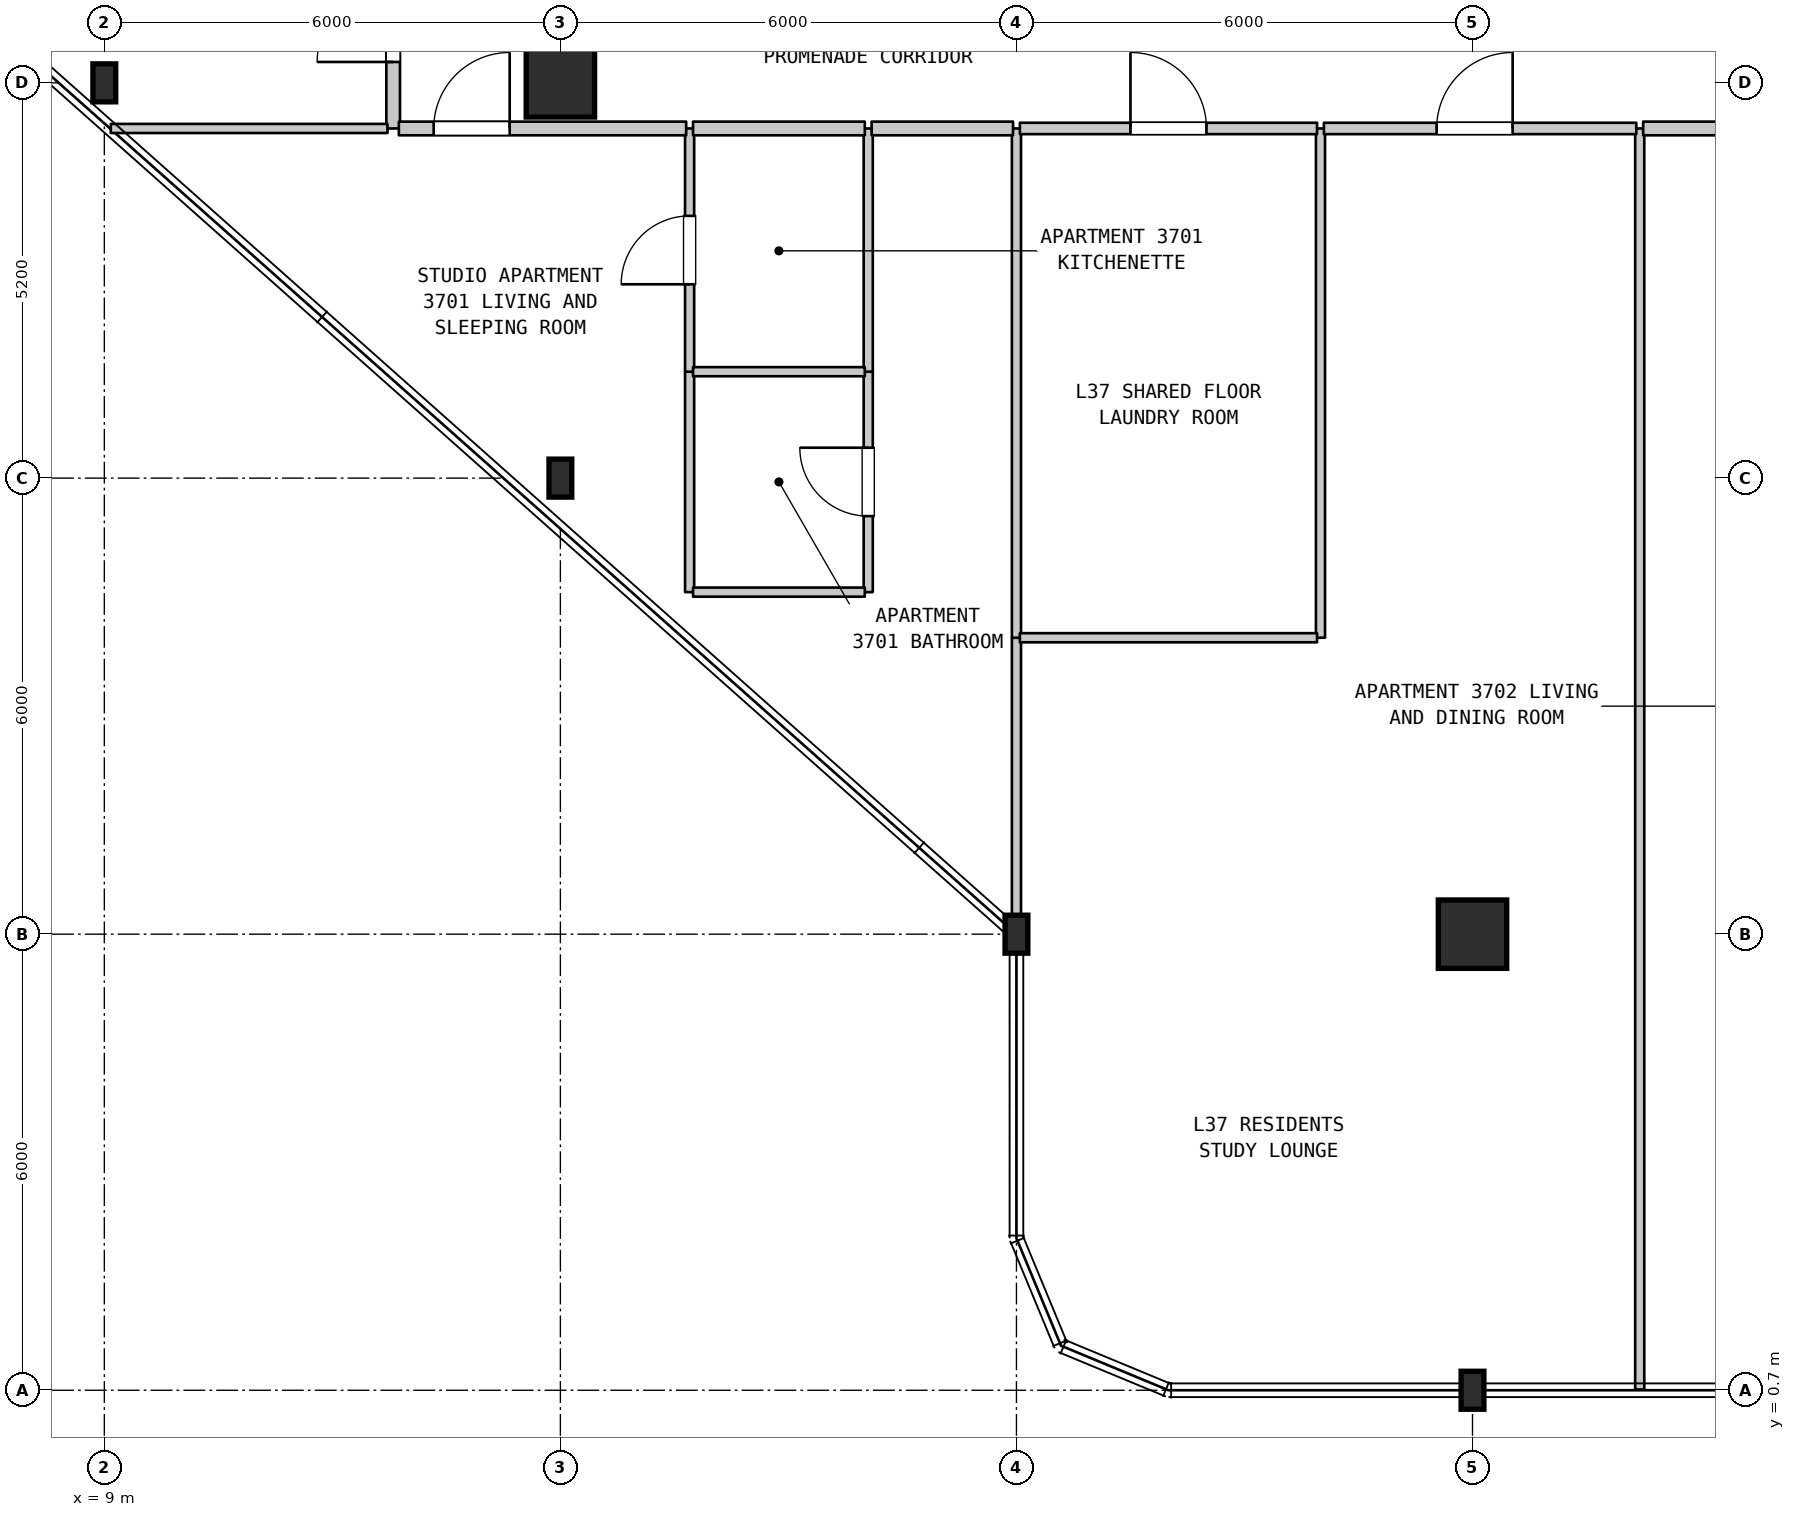
"""IFC4 building model, lengths in metres.
Left out: names, types, materials, properties, quantities, classifications, styles, units other than length and angle.
Written with IfcOpenShell. Run it as: python <this file> out.ifc"""

import sys

from ifc_helpers import new_model, si_unit, direction, frame, frame_2d, origin, origin_2d, place, context, subcontext, project, spatial, rectangle, i_section, extrude, element, fill, save


model = new_model("IFC4")
c1 = context("Model", 3, precision=1e-05, world=origin(), true_north=direction((0.0, 1.0)))
c2 = subcontext(c1, "Body", "Model", "MODEL_VIEW")
j1 = project(units=[si_unit("LENGTHUNIT", "METRE"), si_unit("PLANEANGLEUNIT", "RADIAN")], contexts=[c1])
p1 = place(None, origin())
s1 = spatial("IfcSite", under=j1, at=p1, CompositionType="ELEMENT")
p2 = place(p1, origin())
s2 = spatial("IfcBuilding", under=s1, at=p2, CompositionType="ELEMENT")
p3 = place(p2, frame((0.0, 0.0, 152.0)))
s3 = spatial("IfcBuildingStorey", under=s2, at=p3, CompositionType="ELEMENT", Elevation=152.0)
for number, where, z_axis, x_axis in (
    (1, (9.0, 17.9, 0.0), (0.0, 0.0, 1.0), (1.0, 0.0, 0.0)),
    (2, (15.0, 12.7, 0.0), (0.0, 0.0, 1.0), (1.0, 0.0, 0.0)),
):
    element("IfcColumn", number, at=place(p3, frame(where, z_axis=z_axis, x_axis=x_axis)), inside=s3, PredefinedType="COLUMN", context=c2, shape_type="SweptSolid", body=[
        extrude(i_section(OverallWidth=0.3, OverallDepth=0.5, WebThickness=0.014, FlangeThickness=0.028, FilletRadius=0.027, at=origin_2d()), origin(), (0.0, 0.0, 1.0), 3.7),
    ])
p4 = place(p3, frame((15.0, 17.9, 0.0), z_axis=(0.0, 0.0, 1.0), x_axis=(1.0, 0.0, 0.0)))
e3 = element("IfcColumn", 3, at=p4, inside=s3, PredefinedType="COLUMN", context=c2, shape_type="SweptSolid", body=[
    extrude(rectangle(XDim=0.9, YDim=0.9, at=origin_2d()), origin(), (0.0, 0.0, 1.0), 3.7),
])
for number, where, z_axis, x_axis in (
    (4, (21.0, 6.7, 0.0), (0.0, 0.0, 1.0), (1.0, 0.0, 0.0)),
    (5, (27.0, 0.7, 0.0), (0.0, 0.0, 1.0), (1.0, 0.0, 0.0)),
):
    element("IfcColumn", number, at=place(p3, frame(where, z_axis=z_axis, x_axis=x_axis)), inside=s3, PredefinedType="COLUMN", context=c2, shape_type="SweptSolid", body=[
        extrude(i_section(OverallWidth=0.3, OverallDepth=0.5, WebThickness=0.014, FlangeThickness=0.028, FilletRadius=0.027, at=origin_2d()), origin(), (0.0, 0.0, 1.0), 3.7),
    ])
p5 = place(p3, frame((27.0, 6.7, 0.0), z_axis=(0.0, 0.0, 1.0), x_axis=(1.0, 0.0, 0.0)))
e6 = element("IfcColumn", 6, at=p5, inside=s3, PredefinedType="COLUMN", context=c2, shape_type="SweptSolid", body=[
    extrude(rectangle(XDim=0.9, YDim=0.9, at=origin_2d()), origin(), (0.0, 0.0, 1.0), 3.7),
])
p6 = place(p3, frame((12.8, 17.3, 0.0), z_axis=(0.0, 0.0, 1.0), x_axis=(0.0, 1.0, 0.0)))
e7 = element("IfcWall", 7, at=p6, inside=s3, PredefinedType="STANDARD", context=c2, shape_type="SweptSolid", body=[
    extrude(rectangle(XDim=2.75, YDim=0.18, at=frame_2d((1.375, 0.0))), origin(), (0.0, 0.0, 1.0), 3.385),
])
p7 = place(p6, frame((0.875, 0.0, 0.0)))
e8 = element("IfcOpeningElement", 8, at=p7, cuts=e7, PredefinedType="OPENING", context=c2, shape_type="SweptSolid", body=[
    extrude(rectangle(XDim=1.0, YDim=2.15, at=frame_2d((0.5, 1.075))), frame((0.0, 0.1, 0.0), z_axis=(0.0, -1.0, 0.0), x_axis=(1.0, 0.0, 0.0)), (0.0, 0.0, 1.0), 0.2),
])
p8 = place(p3, frame((16.7, 11.2, 0.0), z_axis=(0.0, 0.0, 1.0), x_axis=(0.0, 1.0, 0.0)))
e9 = element("IfcWall", 9, at=p8, inside=s3, PredefinedType="PARTITIONING", context=c2, shape_type="SweptSolid", body=[
    extrude(rectangle(XDim=2.9, YDim=0.12, at=frame_2d((1.45, 0.0))), origin(), (0.0, 0.0, 1.0), 3.385),
])
p9 = place(p3, frame((16.7, 14.1, 0.0), z_axis=(0.0, 0.0, 1.0), x_axis=(0.0, 1.0, 0.0)))
e10 = element("IfcWall", 10, at=p9, inside=s3, PredefinedType="PARTITIONING", context=c2, shape_type="SweptSolid", body=[
    extrude(rectangle(XDim=3.2, YDim=0.12, at=frame_2d((1.6, 0.0))), origin(), (0.0, 0.0, 1.0), 3.385),
])
p10 = place(p9, frame((1.15, 0.0, 0.0)))
e11 = element("IfcOpeningElement", 11, at=p10, cuts=e10, PredefinedType="OPENING", context=c2, shape_type="SweptSolid", body=[
    extrude(rectangle(XDim=0.9, YDim=2.15, at=frame_2d((0.45, 1.075))), frame((0.0, 0.07, 0.0), z_axis=(0.0, -1.0, 0.0), x_axis=(1.0, 0.0, 0.0)), (0.0, 0.0, 1.0), 0.14),
])
p11 = place(p3, frame((19.05, 11.2, 0.0), z_axis=(0.0, 0.0, 1.0), x_axis=(0.0, 1.0, 0.0)))
e12 = element("IfcWall", 12, at=p11, inside=s3, PredefinedType="PARTITIONING", context=c2, shape_type="SweptSolid", body=[
    extrude(rectangle(XDim=2.9, YDim=0.12, at=frame_2d((1.45, 0.0))), origin(), (0.0, 0.0, 1.0), 3.385),
])
p12 = place(p11, frame((1.0, 0.0, 0.0)))
e13 = element("IfcOpeningElement", 13, at=p12, cuts=e12, PredefinedType="OPENING", context=c2, shape_type="SweptSolid", body=[
    extrude(rectangle(XDim=0.9, YDim=2.1, at=frame_2d((0.45, 1.05))), frame((0.0, 0.07, 0.0), z_axis=(0.0, -1.0, 0.0), x_axis=(1.0, 0.0, 0.0)), (0.0, 0.0, 1.0), 0.14),
])
p13 = place(p3, frame((19.05, 14.1, 0.0), z_axis=(0.0, 0.0, 1.0), x_axis=(0.0, 1.0, 0.0)))
e14 = element("IfcWall", 14, at=p13, inside=s3, PredefinedType="PARTITIONING", context=c2, shape_type="SweptSolid", body=[
    extrude(rectangle(XDim=3.2, YDim=0.12, at=frame_2d((1.6, 0.0))), origin(), (0.0, 0.0, 1.0), 3.385),
])
p14 = place(p3, frame((21.0, 6.71, 0.0), z_axis=(0.0, 0.0, 1.0), x_axis=(0.0, 1.0, 0.0)))
e15 = element("IfcWall", 15, at=p14, inside=s3, PredefinedType="PARTITIONING", context=c2, shape_type="SweptSolid", body=[
    extrude(rectangle(XDim=3.89, YDim=0.12, at=frame_2d((1.945, 0.0))), origin(), (0.0, 0.0, 1.0), 3.385),
])
for number, where, z_axis, x_axis in (
    (16, (21.0, 10.6, 0.0), (0.0, 0.0, 1.0), (0.0, 1.0, 0.0)),
    (17, (25.0, 10.6, 0.0), (0.0, 0.0, 1.0), (0.0, 1.0, 0.0)),
):
    element("IfcWall", number, at=place(p3, frame(where, z_axis=z_axis, x_axis=x_axis)), inside=s3, PredefinedType="PARTITIONING", context=c2, shape_type="SweptSolid", body=[
        extrude(rectangle(XDim=6.7, YDim=0.12, at=frame_2d((3.35, 0.0))), origin(), (0.0, 0.0, 1.0), 3.385),
    ])
p15 = place(p3, frame((29.2, 0.71, 0.0), z_axis=(0.0, 0.0, 1.0), x_axis=(0.0, 1.0, 0.0)))
e18 = element("IfcWall", 18, at=p15, inside=s3, PredefinedType="PARTITIONING", context=c2, shape_type="SweptSolid", body=[
    extrude(rectangle(XDim=16.59, YDim=0.12, at=frame_2d((8.295, 0.0))), origin(), (0.0, 0.0, 1.0), 3.385),
])
p16 = place(p3, frame((21.045, 10.6, 0.0), z_axis=(0.0, 0.0, 1.0), x_axis=(1.0, 0.0, 0.0)))
e19 = element("IfcWall", 19, at=p16, inside=s3, PredefinedType="PARTITIONING", context=c2, shape_type="SweptSolid", body=[
    extrude(rectangle(XDim=3.91, YDim=0.12, at=frame_2d((1.955, 0.0))), origin(), (0.0, 0.0, 1.0), 3.385),
])
for number, where, z_axis, x_axis in (
    (20, (16.745, 11.2, 0.0), (0.0, 0.0, 1.0), (1.0, 0.0, 0.0)),
    (21, (16.745, 14.1, 0.0), (0.0, 0.0, 1.0), (1.0, 0.0, 0.0)),
):
    element("IfcWall", number, at=place(p3, frame(where, z_axis=z_axis, x_axis=x_axis)), inside=s3, PredefinedType="PARTITIONING", context=c2, shape_type="SweptSolid", body=[
        extrude(rectangle(XDim=2.26, YDim=0.12, at=frame_2d((1.13, 0.0))), origin(), (0.0, 0.0, 1.0), 3.385),
    ])
p17 = place(p3, frame((9.085, 17.3, 0.0), z_axis=(0.0, 0.0, 1.0), x_axis=(1.0, 0.0, 0.0)))
e22 = element("IfcWall", 22, at=p17, inside=s3, PredefinedType="PARTITIONING", context=c2, shape_type="SweptSolid", body=[
    extrude(rectangle(XDim=3.64, YDim=0.12, at=frame_2d((1.82, 0.0))), origin(), (0.0, 0.0, 1.0), 3.385),
])
p18 = place(p3, frame((12.875, 17.3, 0.0), z_axis=(0.0, 0.0, 1.0), x_axis=(1.0, 0.0, 0.0)))
e23 = element("IfcWall", 23, at=p18, inside=s3, PredefinedType="STANDARD", context=c2, shape_type="SweptSolid", body=[
    extrude(rectangle(XDim=3.78, YDim=0.18, at=frame_2d((1.89, 0.0))), origin(), (0.0, 0.0, 1.0), 3.385),
])
p19 = place(p18, frame((0.458, 0.0, 0.0)))
e24 = element("IfcOpeningElement", 24, at=p19, cuts=e23, PredefinedType="OPENING", context=c2, shape_type="SweptSolid", body=[
    extrude(rectangle(XDim=1.0, YDim=2.15, at=frame_2d((0.5, 1.075))), frame((0.0, 0.1, 0.0), z_axis=(0.0, -1.0, 0.0), x_axis=(1.0, 0.0, 0.0)), (0.0, 0.0, 1.0), 0.2),
])
p20 = place(p3, frame((16.745, 17.3, 0.0), z_axis=(0.0, 0.0, 1.0), x_axis=(1.0, 0.0, 0.0)))
e25 = element("IfcWall", 25, at=p20, inside=s3, PredefinedType="STANDARD", context=c2, shape_type="SweptSolid", body=[
    extrude(rectangle(XDim=2.26, YDim=0.18, at=frame_2d((1.13, 0.0))), origin(), (0.0, 0.0, 1.0), 3.385),
])
p21 = place(p3, frame((19.095, 17.3, 0.0), z_axis=(0.0, 0.0, 1.0), x_axis=(1.0, 0.0, 0.0)))
e26 = element("IfcWall", 26, at=p21, inside=s3, PredefinedType="STANDARD", context=c2, shape_type="SweptSolid", body=[
    extrude(rectangle(XDim=1.86, YDim=0.18, at=frame_2d((0.93, 0.0))), origin(), (0.0, 0.0, 1.0), 3.385),
])
p22 = place(p3, frame((21.045, 17.3, 0.0), z_axis=(0.0, 0.0, 1.0), x_axis=(1.0, 0.0, 0.0)))
e27 = element("IfcWall", 27, at=p22, inside=s3, PredefinedType="STANDARD", context=c2, shape_type="SweptSolid", body=[
    extrude(rectangle(XDim=3.91, YDim=0.15, at=frame_2d((1.955, 0.0))), origin(), (0.0, 0.0, 1.0), 3.385),
])
p23 = place(p22, frame((1.455, 0.0, 0.0)))
e28 = element("IfcOpeningElement", 28, at=p23, cuts=e27, PredefinedType="OPENING", context=c2, shape_type="SweptSolid", body=[
    extrude(rectangle(XDim=1.0, YDim=2.15, at=frame_2d((0.5, 1.075))), frame((0.0, 0.085, 0.0), z_axis=(0.0, -1.0, 0.0), x_axis=(1.0, 0.0, 0.0)), (0.0, 0.0, 1.0), 0.17),
])
p24 = place(p3, frame((25.045, 17.3, 0.0), z_axis=(0.0, 0.0, 1.0), x_axis=(1.0, 0.0, 0.0)))
e29 = element("IfcWall", 29, at=p24, inside=s3, PredefinedType="STANDARD", context=c2, shape_type="SweptSolid", body=[
    extrude(rectangle(XDim=4.11, YDim=0.15, at=frame_2d((2.055, 0.0))), origin(), (0.0, 0.0, 1.0), 3.385),
])
p25 = place(p24, frame((1.483, 0.0, 0.0)))
e30 = element("IfcOpeningElement", 30, at=p25, cuts=e29, PredefinedType="OPENING", context=c2, shape_type="SweptSolid", body=[
    extrude(rectangle(XDim=1.0, YDim=2.15, at=frame_2d((0.5, 1.075))), frame((0.0, 0.085, 0.0), z_axis=(0.0, -1.0, 0.0), x_axis=(1.0, 0.0, 0.0)), (0.0, 0.0, 1.0), 0.17),
])
p26 = place(p3, frame((29.245, 17.3, 0.0), z_axis=(0.0, 0.0, 1.0), x_axis=(1.0, 0.0, 0.0)))
e31 = element("IfcWall", 31, at=p26, inside=s3, PredefinedType="STANDARD", context=c2, shape_type="SweptSolid", body=[
    extrude(rectangle(XDim=3.51, YDim=0.18, at=frame_2d((1.755, 0.0))), origin(), (0.0, 0.0, 1.0), 3.385),
])
p27 = place(p26, frame((1.255, 0.0, 0.0)))
e32 = element("IfcOpeningElement", 32, at=p27, cuts=e31, PredefinedType="OPENING", context=c2, shape_type="SweptSolid", body=[
    extrude(rectangle(XDim=1.0, YDim=2.15, at=frame_2d((0.5, 1.075))), frame((0.0, 0.1, 0.0), z_axis=(0.0, -1.0, 0.0), x_axis=(1.0, 0.0, 0.0)), (0.0, 0.0, 1.0), 0.2),
])
p28 = place(p7, origin())
e33 = element("IfcDoor", 33, at=p28, inside=s3, OperationType="SINGLE_SWING_LEFT", PredefinedType="DOOR", context=c2, shape_type="SweptSolid", body=[
    extrude(rectangle(XDim=1.0, YDim=2.15, at=frame_2d((0.5, 1.075))), frame((0.0, 0.025, 0.0), z_axis=(0.0, -1.0, 0.0), x_axis=(1.0, 0.0, 0.0)), (0.0, 0.0, 1.0), 0.05),
])
fill(e8, e33)
p29 = place(p10, origin())
e34 = element("IfcDoor", 34, at=p29, inside=s3, OperationType="SINGLE_SWING_LEFT", PredefinedType="DOOR", context=c2, shape_type="SweptSolid", body=[
    extrude(rectangle(XDim=0.9, YDim=2.15, at=frame_2d((0.45, 1.075))), frame((0.0, 0.025, 0.0), z_axis=(0.0, -1.0, 0.0), x_axis=(1.0, 0.0, 0.0)), (0.0, 0.0, 1.0), 0.05),
])
fill(e11, e34)
p30 = place(p12, origin())
e35 = element("IfcDoor", 35, at=p30, inside=s3, OperationType="SINGLE_SWING_RIGHT", PredefinedType="DOOR", context=c2, shape_type="SweptSolid", body=[
    extrude(rectangle(XDim=0.9, YDim=2.1, at=frame_2d((0.45, 1.05))), frame((0.0, 0.025, 0.0), z_axis=(0.0, -1.0, 0.0), x_axis=(1.0, 0.0, 0.0)), (0.0, 0.0, 1.0), 0.05),
])
fill(e13, e35)
p31 = place(p19, origin())
e36 = element("IfcDoor", 36, at=p31, inside=s3, OperationType="SINGLE_SWING_RIGHT", PredefinedType="DOOR", context=c2, shape_type="SweptSolid", body=[
    extrude(rectangle(XDim=1.0, YDim=2.15, at=frame_2d((0.5, 1.075))), frame((0.0, 0.025, 0.0), z_axis=(0.0, -1.0, 0.0), x_axis=(1.0, 0.0, 0.0)), (0.0, 0.0, 1.0), 0.05),
])
fill(e24, e36)
p32 = place(p23, origin())
e37 = element("IfcDoor", 37, at=p32, inside=s3, OperationType="SINGLE_SWING_LEFT", PredefinedType="DOOR", context=c2, shape_type="SweptSolid", body=[
    extrude(rectangle(XDim=1.0, YDim=2.15, at=frame_2d((0.5, 1.075))), frame((0.0, 0.025, 0.0), z_axis=(0.0, -1.0, 0.0), x_axis=(1.0, 0.0, 0.0)), (0.0, 0.0, 1.0), 0.05),
])
fill(e28, e37)
p33 = place(p25, origin())
e38 = element("IfcDoor", 38, at=p33, inside=s3, OperationType="SINGLE_SWING_RIGHT", PredefinedType="DOOR", context=c2, shape_type="SweptSolid", body=[
    extrude(rectangle(XDim=1.0, YDim=2.15, at=frame_2d((0.5, 1.075))), frame((0.0, 0.025, 0.0), z_axis=(0.0, -1.0, 0.0), x_axis=(1.0, 0.0, 0.0)), (0.0, 0.0, 1.0), 0.05),
])
fill(e30, e38)
save(model, sys.argv[1])
